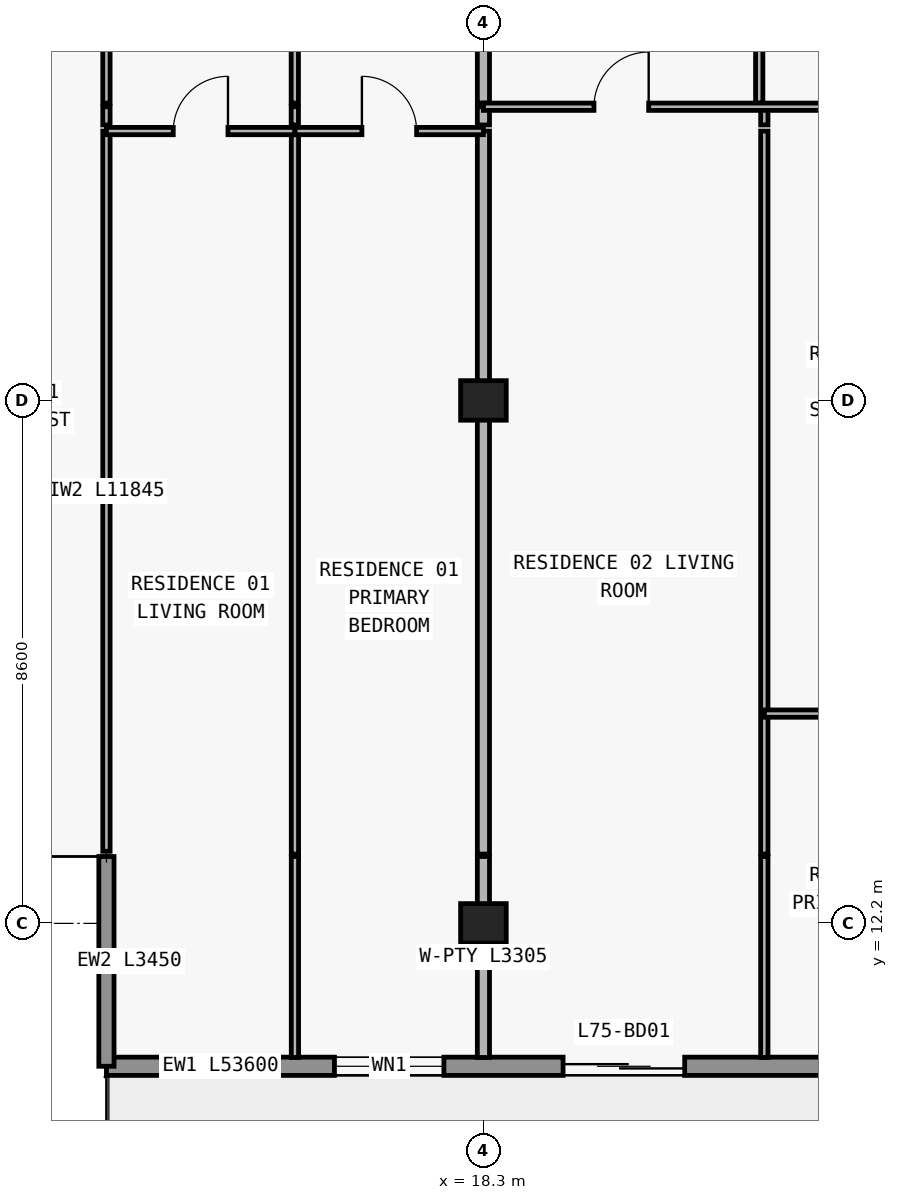
"""IFC4 building model, lengths in metres.
Left out: names, types, materials, properties, quantities, classifications, styles, units other than length and angle.
Written with IfcOpenShell. Run it as: python <this file> out.ifc"""

import sys

from ifc_helpers import new_model, si_unit, direction, frame, frame_2d, origin, origin_2d, place, context, subcontext, project, spatial, rectangle, extrude, element, fill, save


model = new_model("IFC4")
c1 = context("Model", 3, precision=1e-05, world=origin(), true_north=direction((0.0, 1.0)))
c2 = subcontext(c1, "Body", "Model", "MODEL_VIEW")
j1 = project(units=[si_unit("LENGTHUNIT", "METRE"), si_unit("PLANEANGLEUNIT", "RADIAN")], contexts=[c1])
p1 = place(None, origin())
s1 = spatial("IfcSite", under=j1, at=p1, CompositionType="ELEMENT")
p2 = place(p1, origin())
s2 = spatial("IfcBuilding", under=s1, at=p2, CompositionType="ELEMENT")
p3 = place(p2, frame((0.0, 0.0, 266.1)))
s3 = spatial("IfcBuildingStorey", under=s2, at=p3, CompositionType="ELEMENT", Elevation=266.1)
for number, where, z_axis, x_axis in (
    (1, (18.3, 12.2, 0.0), (0.0, 0.0, 1.0), (1.0, 0.0, 0.0)),
    (2, (18.3, 20.8, 0.0), (0.0, 0.0, 1.0), (1.0, 0.0, 0.0)),
):
    element("IfcColumn", number, at=place(p3, frame(where, z_axis=z_axis, x_axis=x_axis)), inside=s3, PredefinedType="COLUMN", context=c2, shape_type="SweptSolid", body=[
        extrude(rectangle(XDim=0.75, YDim=0.65, at=origin_2d()), origin(), (0.0, 0.0, 1.0), 3.0),
    ])
p4 = place(p3, frame((65.7, 9.85, 0.0), z_axis=(0.0, 0.0, 1.0), x_axis=(-1.0, 0.0, 0.0)))
e3 = element("IfcWall", 3, at=p4, inside=s3, PredefinedType="STANDARD", context=c2, shape_type="SweptSolid", body=[
    extrude(rectangle(XDim=53.6, YDim=0.3, at=frame_2d((26.8, 0.0))), origin(), (0.0, 0.0, 1.0), 3.0),
])
p5 = place(p4, frame((48.05, 0.0, 0.85)))
e4 = element("IfcOpeningElement", 4, at=p5, cuts=e3, PredefinedType="OPENING", context=c2, shape_type="SweptSolid", body=[
    extrude(rectangle(XDim=1.8, YDim=1.55, at=frame_2d((0.9, 0.775))), frame((0.0, 0.16, 0.0), z_axis=(0.0, -1.0, 0.0), x_axis=(1.0, 0.0, 0.0)), (0.0, 0.0, 1.0), 0.32),
])
p6 = place(p4, frame((44.09, 0.0, 0.0)))
e5 = element("IfcOpeningElement", 5, at=p6, cuts=e3, PredefinedType="OPENING", context=c2, shape_type="SweptSolid", body=[
    extrude(rectangle(XDim=2.0, YDim=2.3, at=frame_2d((1.0, 1.15))), frame((0.0, 0.16, 0.0), z_axis=(0.0, -1.0, 0.0), x_axis=(1.0, 0.0, 0.0)), (0.0, 0.0, 1.0), 0.32),
])
p7 = place(p4, frame((39.99, 0.0, 0.85)))
e6 = element("IfcOpeningElement", 6, at=p7, cuts=e3, PredefinedType="OPENING", context=c2, shape_type="SweptSolid", body=[
    extrude(rectangle(XDim=1.8, YDim=1.55, at=frame_2d((0.9, 0.775))), frame((0.0, 0.16, 0.0), z_axis=(0.0, -1.0, 0.0), x_axis=(1.0, 0.0, 0.0)), (0.0, 0.0, 1.0), 0.32),
])
p8 = place(p4, frame((36.026, 0.0, 0.0)))
e7 = element("IfcOpeningElement", 7, at=p8, cuts=e3, PredefinedType="OPENING", context=c2, shape_type="SweptSolid", body=[
    extrude(rectangle(XDim=2.0, YDim=2.3, at=frame_2d((1.0, 1.15))), frame((0.0, 0.16, 0.0), z_axis=(0.0, -1.0, 0.0), x_axis=(1.0, 0.0, 0.0)), (0.0, 0.0, 1.0), 0.32),
])
p9 = place(p4, frame((31.726, 0.0, 0.85)))
e8 = element("IfcOpeningElement", 8, at=p9, cuts=e3, PredefinedType="OPENING", context=c2, shape_type="SweptSolid", body=[
    extrude(rectangle(XDim=2.2, YDim=1.55, at=frame_2d((1.1, 0.775))), frame((0.0, 0.16, 0.0), z_axis=(0.0, -1.0, 0.0), x_axis=(1.0, 0.0, 0.0)), (0.0, 0.0, 1.0), 0.32),
])
p10 = place(p4, frame((27.51, 0.0, 0.0)))
e9 = element("IfcOpeningElement", 9, at=p10, cuts=e3, PredefinedType="OPENING", context=c2, shape_type="SweptSolid", body=[
    extrude(rectangle(XDim=2.0, YDim=2.3, at=frame_2d((1.0, 1.15))), frame((0.0, 0.16, 0.0), z_axis=(0.0, -1.0, 0.0), x_axis=(1.0, 0.0, 0.0)), (0.0, 0.0, 1.0), 0.32),
])
p11 = place(p4, frame((23.81, 0.0, 0.85)))
e10 = element("IfcOpeningElement", 10, at=p11, cuts=e3, PredefinedType="OPENING", context=c2, shape_type="SweptSolid", body=[
    extrude(rectangle(XDim=1.8, YDim=1.55, at=frame_2d((0.9, 0.775))), frame((0.0, 0.16, 0.0), z_axis=(0.0, -1.0, 0.0), x_axis=(1.0, 0.0, 0.0)), (0.0, 0.0, 1.0), 0.32),
])
p12 = place(p4, frame((20.026, 0.0, 0.0)))
e11 = element("IfcOpeningElement", 11, at=p12, cuts=e3, PredefinedType="OPENING", context=c2, shape_type="SweptSolid", body=[
    extrude(rectangle(XDim=2.0, YDim=2.3, at=frame_2d((1.0, 1.15))), frame((0.0, 0.16, 0.0), z_axis=(0.0, -1.0, 0.0), x_axis=(1.0, 0.0, 0.0)), (0.0, 0.0, 1.0), 0.32),
])
p13 = place(p4, frame((15.726, 0.0, 0.85)))
e12 = element("IfcOpeningElement", 12, at=p13, cuts=e3, PredefinedType="OPENING", context=c2, shape_type="SweptSolid", body=[
    extrude(rectangle(XDim=2.2, YDim=1.55, at=frame_2d((1.1, 0.775))), frame((0.0, 0.16, 0.0), z_axis=(0.0, -1.0, 0.0), x_axis=(1.0, 0.0, 0.0)), (0.0, 0.0, 1.0), 0.32),
])
p14 = place(p4, frame((11.69, 0.0, 0.0)))
e13 = element("IfcOpeningElement", 13, at=p14, cuts=e3, PredefinedType="OPENING", context=c2, shape_type="SweptSolid", body=[
    extrude(rectangle(XDim=2.0, YDim=2.3, at=frame_2d((1.0, 1.15))), frame((0.0, 0.16, 0.0), z_axis=(0.0, -1.0, 0.0), x_axis=(1.0, 0.0, 0.0)), (0.0, 0.0, 1.0), 0.32),
])
p15 = place(p4, frame((7.01, 0.0, 0.65)))
e14 = element("IfcOpeningElement", 14, at=p15, cuts=e3, PredefinedType="OPENING", context=c2, shape_type="SweptSolid", body=[
    extrude(rectangle(XDim=2.6, YDim=1.85, at=frame_2d((1.3, 0.925))), frame((0.0, 0.16, 0.0), z_axis=(0.0, -1.0, 0.0), x_axis=(1.0, 0.0, 0.0)), (0.0, 0.0, 1.0), 0.32),
])
p16 = place(p4, frame((2.0, 0.0, 0.85)))
e15 = element("IfcOpeningElement", 15, at=p16, cuts=e3, PredefinedType="OPENING", context=c2, shape_type="SweptSolid", body=[
    extrude(rectangle(XDim=2.2, YDim=1.55, at=frame_2d((1.1, 0.775))), frame((0.0, 0.16, 0.0), z_axis=(0.0, -1.0, 0.0), x_axis=(1.0, 0.0, 0.0)), (0.0, 0.0, 1.0), 0.32),
])
p17 = place(p3, frame((12.1, 13.3, 0.0), z_axis=(0.0, 0.0, 1.0), x_axis=(0.0, -1.0, 0.0)))
e16 = element("IfcWall", 16, at=p17, inside=s3, PredefinedType="ELEMENTEDWALL", context=c2, shape_type="SweptSolid", body=[
    extrude(rectangle(XDim=3.45, YDim=0.25, at=frame_2d((1.725, 0.0))), origin(), (0.0, 0.0, 1.0), 3.0),
])
p18 = place(p3, frame((12.1, 13.385, 0.0), z_axis=(0.0, 0.0, 1.0), x_axis=(0.0, 1.0, 0.0)))
e17 = element("IfcWall", 17, at=p18, inside=s3, PredefinedType="PARTITIONING", context=c2, shape_type="SweptSolid", body=[
    extrude(rectangle(XDim=11.845, YDim=0.12, at=frame_2d((5.922, 0.0))), origin(), (0.0, 0.0, 1.0), 3.0),
])
p19 = place(p3, frame((12.1, 25.33, 0.0), z_axis=(0.0, 0.0, 1.0), x_axis=(0.0, 1.0, 0.0)))
e18 = element("IfcWall", 18, at=p19, inside=s3, PredefinedType="PARTITIONING", context=c2, shape_type="SweptSolid", body=[
    extrude(rectangle(XDim=0.3, YDim=0.12, at=frame_2d((0.15, 0.0))), origin(), (0.0, 0.0, 1.0), 3.0),
])
p20 = place(p3, frame((12.1, 25.69, 0.0), z_axis=(0.0, 0.0, 1.0), x_axis=(0.0, 1.0, 0.0)))
e19 = element("IfcWall", 19, at=p20, inside=s3, PredefinedType="PARTITIONING", context=c2, shape_type="SweptSolid", body=[
    extrude(rectangle(XDim=4.69, YDim=0.12, at=frame_2d((2.345, 0.0))), origin(), (0.0, 0.0, 1.0), 3.0),
])
p21 = place(p20, frame((1.895, 0.0, 0.0)))
e20 = element("IfcOpeningElement", 20, at=p21, cuts=e19, PredefinedType="OPENING", context=c2, shape_type="SweptSolid", body=[
    extrude(rectangle(XDim=0.9, YDim=2.15, at=frame_2d((0.45, 1.075))), frame((0.0, 0.07, 0.0), z_axis=(0.0, -1.0, 0.0), x_axis=(1.0, 0.0, 0.0)), (0.0, 0.0, 1.0), 0.14),
])
p22 = place(p3, frame((15.198, 25.33, 0.0), z_axis=(0.0, 0.0, 1.0), x_axis=(0.0, 1.0, 0.0)))
e21 = element("IfcWall", 21, at=p22, inside=s3, PredefinedType="PARTITIONING", context=c2, shape_type="SweptSolid", body=[
    extrude(rectangle(XDim=0.3, YDim=0.12, at=frame_2d((0.15, 0.0))), origin(), (0.0, 0.0, 1.0), 3.0),
])
p23 = place(p3, frame((15.198, 25.69, 0.0), z_axis=(0.0, 0.0, 1.0), x_axis=(0.0, 1.0, 0.0)))
e22 = element("IfcWall", 22, at=p23, inside=s3, PredefinedType="PARTITIONING", context=c2, shape_type="SweptSolid", body=[
    extrude(rectangle(XDim=4.69, YDim=0.12, at=frame_2d((2.345, 0.0))), origin(), (0.0, 0.0, 1.0), 3.0),
])
p24 = place(p23, frame((1.895, 0.0, 0.0)))
e23 = element("IfcOpeningElement", 23, at=p24, cuts=e22, PredefinedType="OPENING", context=c2, shape_type="SweptSolid", body=[
    extrude(rectangle(XDim=0.9, YDim=2.15, at=frame_2d((0.45, 1.075))), frame((0.0, 0.07, 0.0), z_axis=(0.0, -1.0, 0.0), x_axis=(1.0, 0.0, 0.0)), (0.0, 0.0, 1.0), 0.14),
])
p25 = place(p3, frame((15.2, 9.995, 0.0), z_axis=(0.0, 0.0, 1.0), x_axis=(0.0, 1.0, 0.0)))
e24 = element("IfcWall", 24, at=p25, inside=s3, PredefinedType="PARTITIONING", context=c2, shape_type="SweptSolid", body=[
    extrude(rectangle(XDim=3.305, YDim=0.12, at=frame_2d((1.652, 0.0))), origin(), (0.0, 0.0, 1.0), 3.0),
])
p26 = place(p3, frame((15.2, 13.34, 0.0), z_axis=(0.0, 0.0, 1.0), x_axis=(0.0, 1.0, 0.0)))
e25 = element("IfcWall", 25, at=p26, inside=s3, PredefinedType="PARTITIONING", context=c2, shape_type="SweptSolid", body=[
    extrude(rectangle(XDim=11.89, YDim=0.12, at=frame_2d((5.945, 0.0))), origin(), (0.0, 0.0, 1.0), 3.0),
])
p27 = place(p3, frame((18.3, 9.995, 0.0), z_axis=(0.0, 0.0, 1.0), x_axis=(0.0, 1.0, 0.0)))
e26 = element("IfcWall", 26, at=p27, inside=s3, PredefinedType="PARTITIONING", context=c2, shape_type="SweptSolid", body=[
    extrude(rectangle(XDim=3.305, YDim=0.2, at=frame_2d((1.652, 0.0))), origin(), (0.0, 0.0, 1.0), 2.213),
])
p28 = place(p3, frame((18.3, 13.34, 0.0), z_axis=(0.0, 0.0, 1.0), x_axis=(0.0, 1.0, 0.0)))
e27 = element("IfcWall", 27, at=p28, inside=s3, PredefinedType="PARTITIONING", context=c2, shape_type="SweptSolid", body=[
    extrude(rectangle(XDim=11.89, YDim=0.2, at=frame_2d((5.945, 0.0))), origin(), (0.0, 0.0, 1.0), 2.213),
])
p29 = place(p3, frame((18.3, 25.33, 0.0), z_axis=(0.0, 0.0, 1.0), x_axis=(0.0, 1.0, 0.0)))
e28 = element("IfcWall", 28, at=p29, inside=s3, PredefinedType="PARTITIONING", context=c2, shape_type="SweptSolid", body=[
    extrude(rectangle(XDim=0.3, YDim=0.2, at=frame_2d((0.15, 0.0))), origin(), (0.0, 0.0, 1.0), 2.213),
])
p30 = place(p3, frame((18.3, 25.69, 0.0), z_axis=(0.0, 0.0, 1.0), x_axis=(0.0, 1.0, 0.0)))
e29 = element("IfcWall", 29, at=p30, inside=s3, PredefinedType="PARTITIONING", context=c2, shape_type="SweptSolid", body=[
    extrude(rectangle(XDim=4.69, YDim=0.2, at=frame_2d((2.345, 0.0))), origin(), (0.0, 0.0, 1.0), 2.213),
])
p31 = place(p3, frame((22.836, 25.69, 0.0), z_axis=(0.0, 0.0, 1.0), x_axis=(0.0, 1.0, 0.0)))
e30 = element("IfcWall", 30, at=p31, inside=s3, PredefinedType="PARTITIONING", context=c2, shape_type="SweptSolid", body=[
    extrude(rectangle(XDim=4.69, YDim=0.12, at=frame_2d((2.345, 0.0))), origin(), (0.0, 0.0, 1.0), 3.0),
])
p32 = place(p31, frame((1.895, 0.0, 0.0)))
e31 = element("IfcOpeningElement", 31, at=p32, cuts=e30, PredefinedType="OPENING", context=c2, shape_type="SweptSolid", body=[
    extrude(rectangle(XDim=0.9, YDim=2.15, at=frame_2d((0.45, 1.075))), frame((0.0, 0.07, 0.0), z_axis=(0.0, -1.0, 0.0), x_axis=(1.0, 0.0, 0.0)), (0.0, 0.0, 1.0), 0.14),
])
p33 = place(p3, frame((22.92, 9.995, 0.0), z_axis=(0.0, 0.0, 1.0), x_axis=(0.0, 1.0, 0.0)))
e32 = element("IfcWall", 32, at=p33, inside=s3, PredefinedType="PARTITIONING", context=c2, shape_type="SweptSolid", body=[
    extrude(rectangle(XDim=3.305, YDim=0.12, at=frame_2d((1.652, 0.0))), origin(), (0.0, 0.0, 1.0), 3.0),
])
p34 = place(p3, frame((22.92, 13.34, 0.0), z_axis=(0.0, 0.0, 1.0), x_axis=(0.0, 1.0, 0.0)))
e33 = element("IfcWall", 33, at=p34, inside=s3, PredefinedType="PARTITIONING", context=c2, shape_type="SweptSolid", body=[
    extrude(rectangle(XDim=11.89, YDim=0.12, at=frame_2d((5.945, 0.0))), origin(), (0.0, 0.0, 1.0), 3.0),
])
p35 = place(p3, frame((22.92, 25.33, 0.0), z_axis=(0.0, 0.0, 1.0), x_axis=(0.0, 1.0, 0.0)))
e34 = element("IfcWall", 34, at=p35, inside=s3, PredefinedType="PARTITIONING", context=c2, shape_type="SweptSolid", body=[
    extrude(rectangle(XDim=0.3, YDim=0.12, at=frame_2d((0.15, 0.0))), origin(), (0.0, 0.0, 1.0), 3.0),
])
p36 = place(p3, frame((22.92, 15.65, 0.0), z_axis=(0.0, 0.0, 1.0), x_axis=(1.0, 0.0, 0.0)))
e35 = element("IfcWall", 35, at=p36, inside=s3, PredefinedType="PARTITIONING", context=c2, shape_type="SweptSolid", body=[
    extrude(rectangle(XDim=3.78, YDim=0.12, at=frame_2d((1.89, 0.0))), origin(), (0.0, 0.0, 1.0), 3.0),
])
p37 = place(p36, frame((1.44, 0.0, 0.0)))
e36 = element("IfcOpeningElement", 36, at=p37, cuts=e35, PredefinedType="OPENING", context=c2, shape_type="SweptSolid", body=[
    extrude(rectangle(XDim=0.9, YDim=2.15, at=frame_2d((0.45, 1.075))), frame((0.0, 0.07, 0.0), z_axis=(0.0, -1.0, 0.0), x_axis=(1.0, 0.0, 0.0)), (0.0, 0.0, 1.0), 0.14),
])
p38 = place(p3, frame((12.1, 25.23, 0.0), z_axis=(0.0, 0.0, 1.0), x_axis=(1.0, 0.0, 0.0)))
e37 = element("IfcWall", 37, at=p38, inside=s3, PredefinedType="PARTITIONING", context=c2, shape_type="SweptSolid", body=[
    extrude(rectangle(XDim=3.098, YDim=0.12, at=frame_2d((1.549, 0.0))), origin(), (0.0, 0.0, 1.0), 3.0),
])
p39 = place(p38, frame((1.099, 0.0, 0.0)))
e38 = element("IfcOpeningElement", 38, at=p39, cuts=e37, PredefinedType="OPENING", context=c2, shape_type="SweptSolid", body=[
    extrude(rectangle(XDim=0.9, YDim=2.15, at=frame_2d((0.45, 1.075))), frame((0.0, 0.07, 0.0), z_axis=(0.0, -1.0, 0.0), x_axis=(1.0, 0.0, 0.0)), (0.0, 0.0, 1.0), 0.14),
])
p40 = place(p3, frame((15.203, 25.23, 0.0), z_axis=(0.0, 0.0, 1.0), x_axis=(1.0, 0.0, 0.0)))
e39 = element("IfcWall", 39, at=p40, inside=s3, PredefinedType="PARTITIONING", context=c2, shape_type="SweptSolid", body=[
    extrude(rectangle(XDim=3.097, YDim=0.12, at=frame_2d((1.549, 0.0))), origin(), (0.0, 0.0, 1.0), 3.0),
])
p41 = place(p40, frame((1.098, 0.0, 0.0)))
e40 = element("IfcOpeningElement", 40, at=p41, cuts=e39, PredefinedType="OPENING", context=c2, shape_type="SweptSolid", body=[
    extrude(rectangle(XDim=0.9, YDim=2.15, at=frame_2d((0.45, 1.075))), frame((0.0, 0.07, 0.0), z_axis=(0.0, -1.0, 0.0), x_axis=(1.0, 0.0, 0.0)), (0.0, 0.0, 1.0), 0.14),
])
p42 = place(p3, frame((18.3, 25.63, 0.0), z_axis=(0.0, 0.0, 1.0), x_axis=(1.0, 0.0, 0.0)))
e41 = element("IfcWall", 41, at=p42, inside=s3, PredefinedType="PARTITIONING", context=c2, shape_type="SweptSolid", body=[
    extrude(rectangle(XDim=8.18, YDim=0.12, at=frame_2d((4.09, 0.0))), origin(), (0.0, 0.0, 1.0), 3.0),
])
p43 = place(p42, frame((1.818, 0.0, 0.0)))
e42 = element("IfcOpeningElement", 42, at=p43, cuts=e41, PredefinedType="OPENING", context=c2, shape_type="SweptSolid", body=[
    extrude(rectangle(XDim=0.9, YDim=2.15, at=frame_2d((0.45, 1.075))), frame((0.0, 0.07, 0.0), z_axis=(0.0, -1.0, 0.0), x_axis=(1.0, 0.0, 0.0)), (0.0, 0.0, 1.0), 0.14),
])
p44 = place(p42, frame((5.95, 0.0, 0.0)))
e43 = element("IfcOpeningElement", 43, at=p44, cuts=e41, PredefinedType="OPENING", context=c2, shape_type="SweptSolid", body=[
    extrude(rectangle(XDim=0.9, YDim=2.15, at=frame_2d((0.45, 1.075))), frame((0.0, 0.07, 0.0), z_axis=(0.0, -1.0, 0.0), x_axis=(1.0, 0.0, 0.0)), (0.0, 0.0, 1.0), 0.14),
])
p45 = place(p5, origin())
e44 = element("IfcWindow", 44, at=p45, inside=s3, PartitioningType="SINGLE_PANEL", PredefinedType="WINDOW", context=c2, shape_type="SweptSolid", body=[
    extrude(rectangle(XDim=1.8, YDim=1.55, at=frame_2d((0.9, 0.775))), frame((0.0, 0.03, 0.0), z_axis=(0.0, -1.0, 0.0), x_axis=(1.0, 0.0, 0.0)), (0.0, 0.0, 1.0), 0.06),
])
fill(e4, e44)
p46 = place(p6, origin())
e45 = element("IfcDoor", 45, at=p46, inside=s3, OperationType="DOUBLE_DOOR_SLIDING", PredefinedType="DOOR", context=c2, shape_type="SweptSolid", body=[
    extrude(rectangle(XDim=2.0, YDim=2.3, at=frame_2d((1.0, 1.15))), frame((0.0, 0.025, 0.0), z_axis=(0.0, -1.0, 0.0), x_axis=(1.0, 0.0, 0.0)), (0.0, 0.0, 1.0), 0.05),
])
fill(e5, e45)
p47 = place(p39, origin())
e46 = element("IfcDoor", 46, at=p47, inside=s3, OperationType="SINGLE_SWING_RIGHT", PredefinedType="DOOR", context=c2, shape_type="SweptSolid", body=[
    extrude(rectangle(XDim=0.9, YDim=2.15, at=frame_2d((0.45, 1.075))), frame((0.0, 0.025, 0.0), z_axis=(0.0, -1.0, 0.0), x_axis=(1.0, 0.0, 0.0)), (0.0, 0.0, 1.0), 0.05),
])
fill(e38, e46)
p48 = place(p41, origin())
e47 = element("IfcDoor", 47, at=p48, inside=s3, OperationType="SINGLE_SWING_LEFT", PredefinedType="DOOR", context=c2, shape_type="SweptSolid", body=[
    extrude(rectangle(XDim=0.9, YDim=2.15, at=frame_2d((0.45, 1.075))), frame((0.0, 0.025, 0.0), z_axis=(0.0, -1.0, 0.0), x_axis=(1.0, 0.0, 0.0)), (0.0, 0.0, 1.0), 0.05),
])
fill(e40, e47)
p49 = place(p43, origin())
e48 = element("IfcDoor", 48, at=p49, inside=s3, OperationType="SINGLE_SWING_RIGHT", PredefinedType="DOOR", context=c2, shape_type="SweptSolid", body=[
    extrude(rectangle(XDim=0.9, YDim=2.15, at=frame_2d((0.45, 1.075))), frame((0.0, 0.025, 0.0), z_axis=(0.0, -1.0, 0.0), x_axis=(1.0, 0.0, 0.0)), (0.0, 0.0, 1.0), 0.05),
])
fill(e42, e48)
save(model, sys.argv[1])
